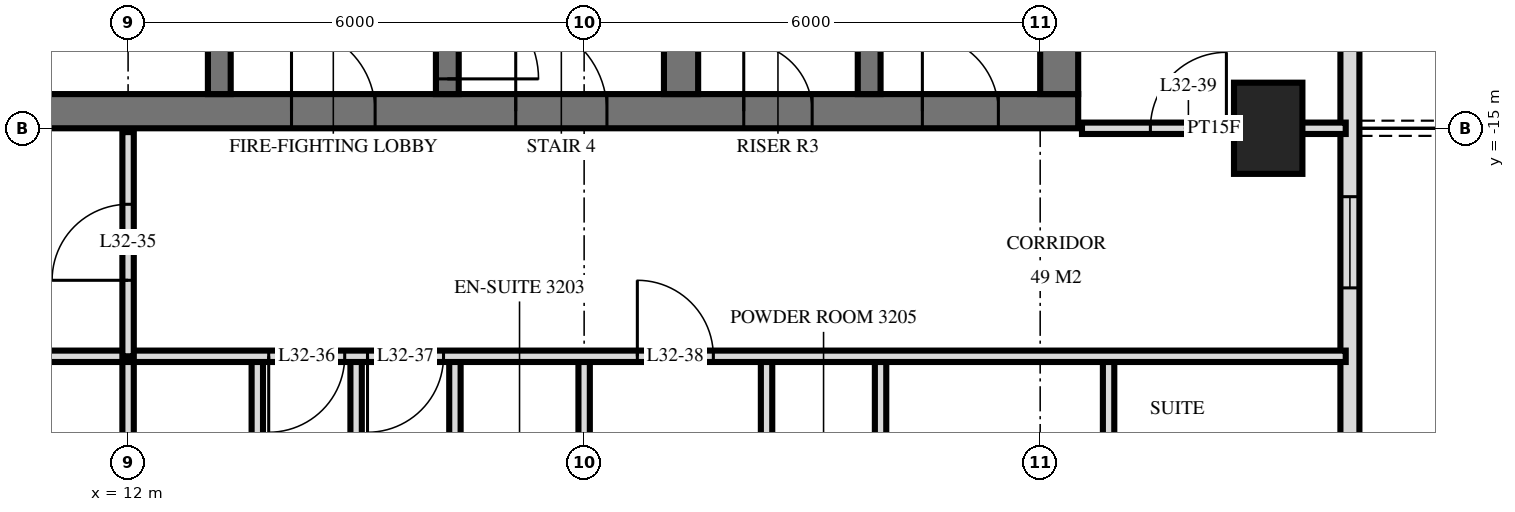
"""IFC4 building model, lengths in metres.
Left out: names, types, materials, properties, quantities, classifications, styles, units other than length and angle.
Written with IfcOpenShell. Run it as: python <this file> out.ifc"""

import sys

from ifc_helpers import new_model, si_unit, direction, frame, frame_2d, origin, origin_2d, place, context, subcontext, project, spatial, rectangle, extrude, element, fill, save


model = new_model("IFC4")
c1 = context("Model", 3, precision=1e-05, world=origin(), true_north=direction((0.0, 1.0)))
c2 = subcontext(c1, "Body", "Model", "MODEL_VIEW")
j1 = project(units=[si_unit("LENGTHUNIT", "METRE"), si_unit("PLANEANGLEUNIT", "RADIAN")], contexts=[c1])
p1 = place(None, origin())
s1 = spatial("IfcSite", under=j1, at=p1, CompositionType="ELEMENT")
p2 = place(p1, origin())
s2 = spatial("IfcBuilding", under=s1, at=p2, CompositionType="ELEMENT")
p3 = place(p2, frame((0.0, 0.0, 127.2)))
s3 = spatial("IfcBuildingStorey", under=s2, at=p3, CompositionType="ELEMENT", Elevation=127.2)
p4 = place(p3, frame((27.0, -15.0, 0.0), z_axis=(0.0, 0.0, 1.0), x_axis=(0.0, 1.0, 0.0)))
e1 = element("IfcColumn", 1, at=p4, inside=s3, PredefinedType="COLUMN", context=c2, shape_type="SweptSolid", body=[
    extrude(rectangle(XDim=1.2, YDim=0.9, at=origin_2d()), origin(), (0.0, 0.0, 1.0), 3.6),
])
p5 = place(p3, frame((10.0, -14.775, 0.0), z_axis=(0.0, 0.0, 1.0), x_axis=(1.0, 0.0, 0.0)))
e2 = element("IfcWall", 2, at=p5, inside=s3, PredefinedType="SHEAR", context=c2, shape_type="SweptSolid", body=[
    extrude(rectangle(XDim=14.5, YDim=0.45, at=frame_2d((7.25, 0.0))), origin(), (0.0, 0.0, 1.0), 3.6),
])
p6 = place(p5, frame((7.1, 0.0, 0.0)))
e3 = element("IfcOpeningElement", 3, at=p6, cuts=e2, PredefinedType="OPENING", context=c2, shape_type="SweptSolid", body=[
    extrude(rectangle(XDim=1.2, YDim=2.1, at=frame_2d((0.6, 1.05))), frame((0.0, 0.235, 0.0), z_axis=(0.0, -1.0, 0.0), x_axis=(1.0, 0.0, 0.0)), (0.0, 0.0, 1.0), 0.47),
])
p7 = place(p5, frame((4.15, 0.0, 0.0)))
e4 = element("IfcOpeningElement", 4, at=p7, cuts=e2, PredefinedType="OPENING", context=c2, shape_type="SweptSolid", body=[
    extrude(rectangle(XDim=1.1, YDim=2.1, at=frame_2d((0.55, 1.05))), frame((0.0, 0.235, 0.0), z_axis=(0.0, -1.0, 0.0), x_axis=(1.0, 0.0, 0.0)), (0.0, 0.0, 1.0), 0.47),
])
p8 = place(p5, frame((10.1, 0.0, 0.0)))
e5 = element("IfcOpeningElement", 5, at=p8, cuts=e2, PredefinedType="OPENING", context=c2, shape_type="SweptSolid", body=[
    extrude(rectangle(XDim=0.9, YDim=2.1, at=frame_2d((0.45, 1.05))), frame((0.0, 0.235, 0.0), z_axis=(0.0, -1.0, 0.0), x_axis=(1.0, 0.0, 0.0)), (0.0, 0.0, 1.0), 0.47),
])
p9 = place(p5, frame((12.45, 0.0, 0.0)))
e6 = element("IfcOpeningElement", 6, at=p9, cuts=e2, PredefinedType="OPENING", context=c2, shape_type="SweptSolid", body=[
    extrude(rectangle(XDim=1.0, YDim=2.1, at=frame_2d((0.5, 1.05))), frame((0.0, 0.235, 0.0), z_axis=(0.0, -1.0, 0.0), x_axis=(1.0, 0.0, 0.0)), (0.0, 0.0, 1.0), 0.47),
])
p10 = place(p3, frame((24.25, -14.55, 0.0), z_axis=(0.0, 0.0, 1.0), x_axis=(0.0, 1.0, 0.0)))
e7 = element("IfcWall", 7, at=p10, inside=s3, PredefinedType="SHEAR", context=c2, shape_type="SweptSolid", body=[
    extrude(rectangle(XDim=14.1, YDim=0.5, at=frame_2d((7.05, 0.0))), origin(), (0.0, 0.0, 1.0), 3.6),
])
p11 = place(p3, frame((13.2, -14.55, 0.0), z_axis=(0.0, 0.0, 1.0), x_axis=(0.0, 1.0, 0.0)))
e8 = element("IfcWall", 8, at=p11, inside=s3, PredefinedType="SHEAR", context=c2, shape_type="SweptSolid", body=[
    extrude(rectangle(XDim=5.4, YDim=0.3, at=frame_2d((2.7, 0.0))), origin(), (0.0, 0.0, 1.0), 3.6),
])
p12 = place(p11, frame((4.0, 0.0, 0.0)))
e9 = element("IfcOpeningElement", 9, at=p12, cuts=e8, PredefinedType="OPENING", context=c2, shape_type="SweptSolid", body=[
    extrude(rectangle(XDim=1.2, YDim=2.1, at=frame_2d((0.6, 1.05))), frame((0.0, 0.16, 0.0), z_axis=(0.0, -1.0, 0.0), x_axis=(1.0, 0.0, 0.0)), (0.0, 0.0, 1.0), 0.32),
])
p13 = place(p3, frame((16.2, -14.55, 0.0), z_axis=(0.0, 0.0, 1.0), x_axis=(0.0, 1.0, 0.0)))
e10 = element("IfcWall", 10, at=p13, inside=s3, PredefinedType="SHEAR", context=c2, shape_type="SweptSolid", body=[
    extrude(rectangle(XDim=5.4, YDim=0.3, at=frame_2d((2.7, 0.0))), origin(), (0.0, 0.0, 1.0), 3.6),
])
p14 = place(p13, frame((0.2, 0.0, 0.0)))
e11 = element("IfcOpeningElement", 11, at=p14, cuts=e10, PredefinedType="OPENING", context=c2, shape_type="SweptSolid", body=[
    extrude(rectangle(XDim=1.2, YDim=2.1, at=frame_2d((0.6, 1.05))), frame((0.0, 0.16, 0.0), z_axis=(0.0, -1.0, 0.0), x_axis=(1.0, 0.0, 0.0)), (0.0, 0.0, 1.0), 0.32),
])
p15 = place(p3, frame((19.275, -14.55, 0.0), z_axis=(0.0, 0.0, 1.0), x_axis=(0.0, 1.0, 0.0)))
e12 = element("IfcWall", 12, at=p15, inside=s3, PredefinedType="SHEAR", context=c2, shape_type="SweptSolid", body=[
    extrude(rectangle(XDim=5.4, YDim=0.45, at=frame_2d((2.7, 0.0))), origin(), (0.0, 0.0, 1.0), 3.6),
])
p16 = place(p3, frame((21.75, -14.55, 0.0), z_axis=(0.0, 0.0, 1.0), x_axis=(0.0, 1.0, 0.0)))
e13 = element("IfcWall", 13, at=p16, inside=s3, PredefinedType="SHEAR", context=c2, shape_type="SweptSolid", body=[
    extrude(rectangle(XDim=5.4, YDim=0.3, at=frame_2d((2.7, 0.0))), origin(), (0.0, 0.0, 1.0), 3.6),
])
p17 = place(p3, frame((28.075, -29.275, 0.0), z_axis=(0.0, 0.0, 1.0), x_axis=(0.0, 1.0, 0.0)))
e14 = element("IfcWall", 14, at=p17, inside=s3, PredefinedType="SOLIDWALL", context=c2, shape_type="SweptSolid", body=[
    extrude(rectangle(XDim=25.951, YDim=0.25, at=frame_2d((12.975, 0.0))), origin(), (0.0, 0.0, 1.0), 3.32),
])
p18 = place(p17, frame((0.575, 0.0, 0.0)))
e15 = element("IfcOpeningElement", 15, at=p18, cuts=e14, PredefinedType="OPENING", context=c2, shape_type="SweptSolid", body=[
    extrude(rectangle(XDim=1.8, YDim=2.4, at=frame_2d((0.9, 1.2))), frame((0.0, 0.135, 0.0), z_axis=(0.0, -1.0, 0.0), x_axis=(1.0, 0.0, 0.0)), (0.0, 0.0, 1.0), 0.27),
])
p19 = place(p17, frame((3.325, 0.0, 0.3)))
e16 = element("IfcOpeningElement", 16, at=p19, cuts=e14, PredefinedType="OPENING", context=c2, shape_type="SweptSolid", body=[
    extrude(rectangle(XDim=1.8, YDim=2.1, at=frame_2d((0.9, 1.05))), frame((0.0, 0.135, 0.0), z_axis=(0.0, -1.0, 0.0), x_axis=(1.0, 0.0, 0.0)), (0.0, 0.0, 1.0), 0.27),
])
p20 = place(p17, frame((8.275, 0.0, 0.0)))
e17 = element("IfcOpeningElement", 17, at=p20, cuts=e14, PredefinedType="OPENING", context=c2, shape_type="SweptSolid", body=[
    extrude(rectangle(XDim=1.8, YDim=2.4, at=frame_2d((0.9, 1.2))), frame((0.0, 0.135, 0.0), z_axis=(0.0, -1.0, 0.0), x_axis=(1.0, 0.0, 0.0)), (0.0, 0.0, 1.0), 0.27),
])
p21 = place(p17, frame((12.175, 0.0, 0.3)))
e18 = element("IfcOpeningElement", 18, at=p21, cuts=e14, PredefinedType="OPENING", context=c2, shape_type="SweptSolid", body=[
    extrude(rectangle(XDim=1.2, YDim=2.1, at=frame_2d((0.6, 1.05))), frame((0.0, 0.135, 0.0), z_axis=(0.0, -1.0, 0.0), x_axis=(1.0, 0.0, 0.0)), (0.0, 0.0, 1.0), 0.27),
])
p22 = place(p17, frame((16.375, 0.0, 0.0)))
e19 = element("IfcOpeningElement", 19, at=p22, cuts=e14, PredefinedType="OPENING", context=c2, shape_type="SweptSolid", body=[
    extrude(rectangle(XDim=1.8, YDim=2.4, at=frame_2d((0.9, 1.2))), frame((0.0, 0.135, 0.0), z_axis=(0.0, -1.0, 0.0), x_axis=(1.0, 0.0, 0.0)), (0.0, 0.0, 1.0), 0.27),
])
p23 = place(p3, frame((24.9, -22.2, 0.0), z_axis=(0.0, 0.0, 1.0), x_axis=(0.0, 1.0, 0.0)))
e20 = element("IfcWall", 20, at=p23, inside=s3, PredefinedType="PARTITIONING", context=c2, shape_type="SweptSolid", body=[
    extrude(rectangle(XDim=4.2, YDim=0.15, at=frame_2d((2.1, 0.0))), origin(), (0.0, 0.0, 1.0), 3.32),
])
p24 = place(p3, frame((21.9, -22.2, 0.0), z_axis=(0.0, 0.0, 1.0), x_axis=(0.0, 1.0, 0.0)))
e21 = element("IfcWall", 21, at=p24, inside=s3, PredefinedType="PLUMBINGWALL", context=c2, shape_type="SweptSolid", body=[
    extrude(rectangle(XDim=4.2, YDim=0.15, at=frame_2d((2.1, 0.0))), origin(), (0.0, 0.0, 1.0), 3.32),
])
p25 = place(p3, frame((20.4, -22.2, 0.0), z_axis=(0.0, 0.0, 1.0), x_axis=(0.0, 1.0, 0.0)))
e22 = element("IfcWall", 22, at=p25, inside=s3, PredefinedType="PARTITIONING", context=c2, shape_type="SweptSolid", body=[
    extrude(rectangle(XDim=4.2, YDim=0.15, at=frame_2d((2.1, 0.0))), origin(), (0.0, 0.0, 1.0), 3.32),
])
p26 = place(p25, frame((1.6, 0.0, 0.0)))
e23 = element("IfcOpeningElement", 23, at=p26, cuts=e22, PredefinedType="OPENING", context=c2, shape_type="SweptSolid", body=[
    extrude(rectangle(XDim=1.0, YDim=2.1, at=frame_2d((0.5, 1.05))), frame((0.0, 0.085, 0.0), z_axis=(0.0, -1.0, 0.0), x_axis=(1.0, 0.0, 0.0)), (0.0, 0.0, 1.0), 0.17),
])
p27 = place(p3, frame((18.0, -22.2, 0.0), z_axis=(0.0, 0.0, 1.0), x_axis=(0.0, 1.0, 0.0)))
e24 = element("IfcWall", 24, at=p27, inside=s3, PredefinedType="PARTITIONING", context=c2, shape_type="SweptSolid", body=[
    extrude(rectangle(XDim=4.2, YDim=0.15, at=frame_2d((2.1, 0.0))), origin(), (0.0, 0.0, 1.0), 3.32),
])
p28 = place(p3, frame((16.3, -23.0, 0.0), z_axis=(0.0, 0.0, 1.0), x_axis=(0.0, 1.0, 0.0)))
e25 = element("IfcWall", 25, at=p28, inside=s3, PredefinedType="PARTITIONING", context=c2, shape_type="SweptSolid", body=[
    extrude(rectangle(XDim=5.0, YDim=0.15, at=frame_2d((2.5, 0.0))), origin(), (0.0, 0.0, 1.0), 3.32),
])
p29 = place(p28, frame((2.12, 0.0, 0.0)))
e26 = element("IfcOpeningElement", 26, at=p29, cuts=e25, PredefinedType="OPENING", context=c2, shape_type="SweptSolid", body=[
    extrude(rectangle(XDim=0.8, YDim=2.1, at=frame_2d((0.4, 1.05))), frame((0.0, 0.085, 0.0), z_axis=(0.0, -1.0, 0.0), x_axis=(1.0, 0.0, 0.0)), (0.0, 0.0, 1.0), 0.17),
])
p30 = place(p3, frame((15.0, -33.62, 0.0), z_axis=(0.0, 0.0, 1.0), x_axis=(0.0, 1.0, 0.0)))
e27 = element("IfcWall", 27, at=p30, inside=s3, PredefinedType="PARTITIONING", context=c2, shape_type="SweptSolid", body=[
    extrude(rectangle(XDim=15.62, YDim=0.15, at=frame_2d((7.81, 0.0))), origin(), (0.0, 0.0, 1.0), 3.32),
])
p31 = place(p3, frame((13.7, -23.0, 0.0), z_axis=(0.0, 0.0, 1.0), x_axis=(0.0, 1.0, 0.0)))
e28 = element("IfcWall", 28, at=p31, inside=s3, PredefinedType="PARTITIONING", context=c2, shape_type="SweptSolid", body=[
    extrude(rectangle(XDim=5.0, YDim=0.15, at=frame_2d((2.5, 0.0))), origin(), (0.0, 0.0, 1.0), 3.32),
])
p32 = place(p31, frame((2.08, 0.0, 0.0)))
e29 = element("IfcOpeningElement", 29, at=p32, cuts=e28, PredefinedType="OPENING", context=c2, shape_type="SweptSolid", body=[
    extrude(rectangle(XDim=0.8, YDim=2.1, at=frame_2d((0.4, 1.05))), frame((0.0, 0.085, 0.0), z_axis=(0.0, -1.0, 0.0), x_axis=(1.0, 0.0, 0.0)), (0.0, 0.0, 1.0), 0.17),
])
p33 = place(p3, frame((12.0, -18.0, 0.0), z_axis=(0.0, 0.0, 1.0), x_axis=(0.0, 1.0, 0.0)))
e30 = element("IfcWall", 30, at=p33, inside=s3, PredefinedType="PARTITIONING", context=c2, shape_type="SweptSolid", body=[
    extrude(rectangle(XDim=2.95, YDim=0.15, at=frame_2d((1.475, 0.0))), origin(), (0.0, 0.0, 1.0), 3.32),
])
p34 = place(p33, frame((1.0, 0.0, 0.0)))
e31 = element("IfcOpeningElement", 31, at=p34, cuts=e30, PredefinedType="OPENING", context=c2, shape_type="SweptSolid", body=[
    extrude(rectangle(XDim=1.0, YDim=2.1, at=frame_2d((0.5, 1.05))), frame((0.0, 0.085, 0.0), z_axis=(0.0, -1.0, 0.0), x_axis=(1.0, 0.0, 0.0)), (0.0, 0.0, 1.0), 0.17),
])
p35 = place(p3, frame((12.0, -33.62, 0.0), z_axis=(0.0, 0.0, 1.0), x_axis=(0.0, 1.0, 0.0)))
e32 = element("IfcWall", 32, at=p35, inside=s3, PredefinedType="PARTITIONING", context=c2, shape_type="SweptSolid", body=[
    extrude(rectangle(XDim=15.62, YDim=0.15, at=frame_2d((7.81, 0.0))), origin(), (0.0, 0.0, 1.0), 3.32),
])
p36 = place(p3, frame((-28.02, -18.0, 0.0), z_axis=(0.0, 0.0, 1.0), x_axis=(1.0, 0.0, 0.0)))
e33 = element("IfcWall", 33, at=p36, inside=s3, PredefinedType="PARTITIONING", context=c2, shape_type="SweptSolid", body=[
    extrude(rectangle(XDim=56.04, YDim=0.15, at=frame_2d((28.02, 0.0))), origin(), (0.0, 0.0, 1.0), 3.32),
])
p37 = place(p36, frame((13.17, 0.0, 0.0)))
e34 = element("IfcOpeningElement", 34, at=p37, cuts=e33, PredefinedType="OPENING", context=c2, shape_type="SweptSolid", body=[
    extrude(rectangle(XDim=1.0, YDim=2.1, at=frame_2d((0.5, 1.05))), frame((0.0, 0.085, 0.0), z_axis=(0.0, -1.0, 0.0), x_axis=(1.0, 0.0, 0.0)), (0.0, 0.0, 1.0), 0.17),
])
p38 = place(p36, frame((11.32, 0.0, 0.0)))
e35 = element("IfcOpeningElement", 35, at=p38, cuts=e33, PredefinedType="OPENING", context=c2, shape_type="SweptSolid", body=[
    extrude(rectangle(XDim=1.0, YDim=2.1, at=frame_2d((0.5, 1.05))), frame((0.0, 0.085, 0.0), z_axis=(0.0, -1.0, 0.0), x_axis=(1.0, 0.0, 0.0)), (0.0, 0.0, 1.0), 0.17),
])
p39 = place(p36, frame((41.87, 0.0, 0.0)))
e36 = element("IfcOpeningElement", 36, at=p39, cuts=e33, PredefinedType="OPENING", context=c2, shape_type="SweptSolid", body=[
    extrude(rectangle(XDim=1.0, YDim=2.1, at=frame_2d((0.5, 1.05))), frame((0.0, 0.085, 0.0), z_axis=(0.0, -1.0, 0.0), x_axis=(1.0, 0.0, 0.0)), (0.0, 0.0, 1.0), 0.17),
])
p40 = place(p36, frame((43.17, 0.0, 0.0)))
e37 = element("IfcOpeningElement", 37, at=p40, cuts=e33, PredefinedType="OPENING", context=c2, shape_type="SweptSolid", body=[
    extrude(rectangle(XDim=1.0, YDim=2.1, at=frame_2d((0.5, 1.05))), frame((0.0, 0.085, 0.0), z_axis=(0.0, -1.0, 0.0), x_axis=(1.0, 0.0, 0.0)), (0.0, 0.0, 1.0), 0.17),
])
p41 = place(p36, frame((46.72, 0.0, 0.0)))
e38 = element("IfcOpeningElement", 38, at=p41, cuts=e33, PredefinedType="OPENING", context=c2, shape_type="SweptSolid", body=[
    extrude(rectangle(XDim=1.0, YDim=2.1, at=frame_2d((0.5, 1.05))), frame((0.0, 0.085, 0.0), z_axis=(0.0, -1.0, 0.0), x_axis=(1.0, 0.0, 0.0)), (0.0, 0.0, 1.0), 0.17),
])
p42 = place(p36, frame((21.52, 0.0, 0.0)))
e39 = element("IfcOpeningElement", 39, at=p42, cuts=e33, PredefinedType="OPENING", context=c2, shape_type="SweptSolid", body=[
    extrude(rectangle(XDim=1.0, YDim=2.1, at=frame_2d((0.5, 1.05))), frame((0.0, 0.085, 0.0), z_axis=(0.0, -1.0, 0.0), x_axis=(1.0, 0.0, 0.0)), (0.0, 0.0, 1.0), 0.17),
])
p43 = place(p36, frame((33.52, 0.0, 0.0)))
e40 = element("IfcOpeningElement", 40, at=p43, cuts=e33, PredefinedType="OPENING", context=c2, shape_type="SweptSolid", body=[
    extrude(rectangle(XDim=1.0, YDim=2.1, at=frame_2d((0.5, 1.05))), frame((0.0, 0.085, 0.0), z_axis=(0.0, -1.0, 0.0), x_axis=(1.0, 0.0, 0.0)), (0.0, 0.0, 1.0), 0.17),
])
p44 = place(p3, frame((24.55, -15.0, 0.0), z_axis=(0.0, 0.0, 1.0), x_axis=(1.0, 0.0, 0.0)))
e41 = element("IfcWall", 41, at=p44, inside=s3, PredefinedType="PARTITIONING", context=c2, shape_type="SweptSolid", body=[
    extrude(rectangle(XDim=3.47, YDim=0.15, at=frame_2d((1.735, 0.0))), origin(), (0.0, 0.0, 1.0), 3.32),
])
p45 = place(p44, frame((0.9, 0.0, 0.0)))
e42 = element("IfcOpeningElement", 42, at=p45, cuts=e41, PredefinedType="OPENING", context=c2, shape_type="SweptSolid", body=[
    extrude(rectangle(XDim=1.0, YDim=2.1, at=frame_2d((0.5, 1.05))), frame((0.0, 0.085, 0.0), z_axis=(0.0, -1.0, 0.0), x_axis=(1.0, 0.0, 0.0)), (0.0, 0.0, 1.0), 0.17),
])
p46 = place(p21, origin())
e43 = element("IfcWindow", 43, at=p46, inside=s3, PartitioningType="SINGLE_PANEL", PredefinedType="WINDOW", context=c2, shape_type="SweptSolid", body=[
    extrude(rectangle(XDim=1.2, YDim=2.1, at=frame_2d((0.6, 1.05))), frame((0.0, 0.03, 0.0), z_axis=(0.0, -1.0, 0.0), x_axis=(1.0, 0.0, 0.0)), (0.0, 0.0, 1.0), 0.06),
])
fill(e18, e43)
p47 = place(p6, origin())
e44 = element("IfcDoor", 44, at=p47, inside=s3, OperationType="SINGLE_SWING_RIGHT", PredefinedType="DOOR", context=c2, shape_type="SweptSolid", body=[
    extrude(rectangle(XDim=1.2, YDim=2.1, at=frame_2d((0.6, 1.05))), frame((0.0, 0.025, 0.0), z_axis=(0.0, -1.0, 0.0), x_axis=(1.0, 0.0, 0.0)), (0.0, 0.0, 1.0), 0.05),
])
fill(e3, e44)
p48 = place(p7, origin())
e45 = element("IfcDoor", 45, at=p48, inside=s3, OperationType="SINGLE_SWING_RIGHT", PredefinedType="DOOR", context=c2, shape_type="SweptSolid", body=[
    extrude(rectangle(XDim=1.1, YDim=2.1, at=frame_2d((0.55, 1.05))), frame((0.0, 0.025, 0.0), z_axis=(0.0, -1.0, 0.0), x_axis=(1.0, 0.0, 0.0)), (0.0, 0.0, 1.0), 0.05),
])
fill(e4, e45)
p49 = place(p8, origin())
e46 = element("IfcDoor", 46, at=p49, inside=s3, OperationType="SINGLE_SWING_RIGHT", PredefinedType="DOOR", context=c2, shape_type="SweptSolid", body=[
    extrude(rectangle(XDim=0.9, YDim=2.1, at=frame_2d((0.45, 1.05))), frame((0.0, 0.025, 0.0), z_axis=(0.0, -1.0, 0.0), x_axis=(1.0, 0.0, 0.0)), (0.0, 0.0, 1.0), 0.05),
])
fill(e5, e46)
p50 = place(p9, origin())
e47 = element("IfcDoor", 47, at=p50, inside=s3, OperationType="SINGLE_SWING_RIGHT", PredefinedType="DOOR", context=c2, shape_type="SweptSolid", body=[
    extrude(rectangle(XDim=1.0, YDim=2.1, at=frame_2d((0.5, 1.05))), frame((0.0, 0.025, 0.0), z_axis=(0.0, -1.0, 0.0), x_axis=(1.0, 0.0, 0.0)), (0.0, 0.0, 1.0), 0.05),
])
fill(e6, e47)
p51 = place(p14, frame((0.6, 0.0, 0.0), z_axis=(0.0, 0.0, 1.0), x_axis=(-1.0, 0.0, 0.0)))
e48 = element("IfcDoor", 48, at=p51, inside=s3, OperationType="SINGLE_SWING_LEFT", PredefinedType="DOOR", context=c2, shape_type="SweptSolid", body=[
    extrude(rectangle(XDim=1.2, YDim=2.1, at=frame_2d((0.0, 1.05))), frame((0.0, -0.025, 0.0), z_axis=(0.0, 1.0, 0.0), x_axis=(-1.0, 0.0, 0.0)), (0.0, 0.0, 1.0), 0.05),
])
fill(e11, e48)
p52 = place(p34, origin())
e49 = element("IfcDoor", 49, at=p52, inside=s3, OperationType="SINGLE_SWING_RIGHT", PredefinedType="DOOR", context=c2, shape_type="SweptSolid", body=[
    extrude(rectangle(XDim=1.0, YDim=2.1, at=frame_2d((0.5, 1.05))), frame((0.0, 0.025, 0.0), z_axis=(0.0, -1.0, 0.0), x_axis=(1.0, 0.0, 0.0)), (0.0, 0.0, 1.0), 0.05),
])
fill(e31, e49)
p53 = place(p39, frame((0.5, 0.0, 0.0), z_axis=(0.0, 0.0, 1.0), x_axis=(-1.0, 0.0, 0.0)))
e50 = element("IfcDoor", 50, at=p53, inside=s3, OperationType="SINGLE_SWING_LEFT", PredefinedType="DOOR", context=c2, shape_type="SweptSolid", body=[
    extrude(rectangle(XDim=1.0, YDim=2.1, at=frame_2d((0.0, 1.05))), frame((0.0, -0.025, 0.0), z_axis=(0.0, 1.0, 0.0), x_axis=(-1.0, 0.0, 0.0)), (0.0, 0.0, 1.0), 0.05),
])
fill(e36, e50)
p54 = place(p40, frame((0.5, 0.0, 0.0), z_axis=(0.0, 0.0, 1.0), x_axis=(-1.0, 0.0, 0.0)))
e51 = element("IfcDoor", 51, at=p54, inside=s3, OperationType="SINGLE_SWING_LEFT", PredefinedType="DOOR", context=c2, shape_type="SweptSolid", body=[
    extrude(rectangle(XDim=1.0, YDim=2.1, at=frame_2d((0.0, 1.05))), frame((0.0, -0.025, 0.0), z_axis=(0.0, 1.0, 0.0), x_axis=(-1.0, 0.0, 0.0)), (0.0, 0.0, 1.0), 0.05),
])
fill(e37, e51)
p55 = place(p41, origin())
e52 = element("IfcDoor", 52, at=p55, inside=s3, OperationType="SINGLE_SWING_RIGHT", PredefinedType="DOOR", context=c2, shape_type="SweptSolid", body=[
    extrude(rectangle(XDim=1.0, YDim=2.1, at=frame_2d((0.5, 1.05))), frame((0.0, 0.025, 0.0), z_axis=(0.0, -1.0, 0.0), x_axis=(1.0, 0.0, 0.0)), (0.0, 0.0, 1.0), 0.05),
])
fill(e38, e52)
p56 = place(p45, origin())
e53 = element("IfcDoor", 53, at=p56, inside=s3, OperationType="SINGLE_SWING_LEFT", PredefinedType="DOOR", context=c2, shape_type="SweptSolid", body=[
    extrude(rectangle(XDim=1.0, YDim=2.1, at=frame_2d((0.5, 1.05))), frame((0.0, 0.025, 0.0), z_axis=(0.0, -1.0, 0.0), x_axis=(1.0, 0.0, 0.0)), (0.0, 0.0, 1.0), 0.05),
])
fill(e42, e53)
save(model, sys.argv[1])
